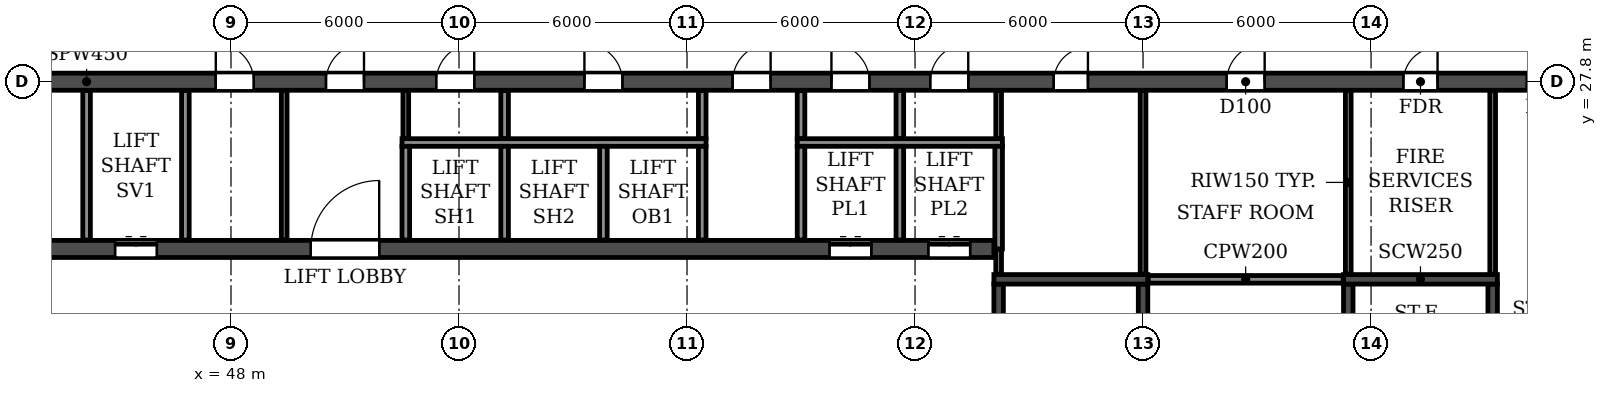
"""IFC4 building model, lengths in metres.
Left out: names, types, materials, properties, quantities, classifications, styles, units other than length and angle.
Written with IfcOpenShell. Run it as: python <this file> out.ifc"""

import sys

from ifc_helpers import new_model, si_unit, direction, frame, frame_2d, origin, place, context, subcontext, project, spatial, rectangle, extrude, element, fill, save


model = new_model("IFC4")
c1 = context("Model", 3, precision=1e-05, world=origin(), true_north=direction((0.0, 1.0)))
c2 = subcontext(c1, "Body", "Model", "MODEL_VIEW")
j1 = project(units=[si_unit("LENGTHUNIT", "METRE"), si_unit("PLANEANGLEUNIT", "RADIAN")], contexts=[c1])
p1 = place(None, origin())
s1 = spatial("IfcSite", under=j1, at=p1, CompositionType="ELEMENT")
p2 = place(p1, origin())
s2 = spatial("IfcBuilding", under=s1, at=p2, CompositionType="ELEMENT")
p3 = place(p2, frame((0.0, 0.0, 15.0)))
s3 = spatial("IfcBuildingStorey", under=s2, at=p3, CompositionType="ELEMENT", Elevation=15.0)
p4 = place(p3, frame((18.0, 27.8, 0.0), z_axis=(0.0, 0.0, 1.0), x_axis=(1.0, 0.0, 0.0)))
e1 = element("IfcWall", 1, at=p4, inside=s3, PredefinedType="SOLIDWALL", context=c2, shape_type="SweptSolid", body=[
    extrude(rectangle(XDim=66.0, YDim=0.45, at=frame_2d((33.0, 0.0))), origin(), (0.0, 0.0, 1.0), 3.92),
])
p5 = place(p4, frame((0.9, 0.0, 0.0)))
e2 = element("IfcOpeningElement", 2, at=p5, cuts=e1, PredefinedType="OPENING", context=c2, shape_type="SweptSolid", body=[
    extrude(rectangle(XDim=1.0, YDim=2.1, at=frame_2d((0.5, 1.05))), frame((0.0, 0.235, 0.0), z_axis=(0.0, -1.0, 0.0), x_axis=(1.0, 0.0, 0.0)), (0.0, 0.0, 1.0), 0.47),
])
p6 = place(p4, frame((4.25, 0.0, 0.0)))
e3 = element("IfcOpeningElement", 3, at=p6, cuts=e1, PredefinedType="OPENING", context=c2, shape_type="SweptSolid", body=[
    extrude(rectangle(XDim=0.9, YDim=2.1, at=frame_2d((0.45, 1.05))), frame((0.0, 0.235, 0.0), z_axis=(0.0, -1.0, 0.0), x_axis=(1.0, 0.0, 0.0)), (0.0, 0.0, 1.0), 0.47),
])
p7 = place(p4, frame((8.85, 0.0, 0.0)))
e4 = element("IfcOpeningElement", 4, at=p7, cuts=e1, PredefinedType="OPENING", context=c2, shape_type="SweptSolid", body=[
    extrude(rectangle(XDim=0.9, YDim=2.1, at=frame_2d((0.45, 1.05))), frame((0.0, 0.235, 0.0), z_axis=(0.0, -1.0, 0.0), x_axis=(1.0, 0.0, 0.0)), (0.0, 0.0, 1.0), 0.47),
])
p8 = place(p4, frame((13.45, 0.0, 0.0)))
e5 = element("IfcOpeningElement", 5, at=p8, cuts=e1, PredefinedType="OPENING", context=c2, shape_type="SweptSolid", body=[
    extrude(rectangle(XDim=0.9, YDim=2.1, at=frame_2d((0.45, 1.05))), frame((0.0, 0.235, 0.0), z_axis=(0.0, -1.0, 0.0), x_axis=(1.0, 0.0, 0.0)), (0.0, 0.0, 1.0), 0.47),
])
p9 = place(p4, frame((16.6, 0.0, 0.0)))
e6 = element("IfcOpeningElement", 6, at=p9, cuts=e1, PredefinedType="OPENING", context=c2, shape_type="SweptSolid", body=[
    extrude(rectangle(XDim=1.0, YDim=2.1, at=frame_2d((0.5, 1.05))), frame((0.0, 0.235, 0.0), z_axis=(0.0, -1.0, 0.0), x_axis=(1.0, 0.0, 0.0)), (0.0, 0.0, 1.0), 0.47),
])
p10 = place(p4, frame((21.8, 0.0, 0.0)))
e7 = element("IfcOpeningElement", 7, at=p10, cuts=e1, PredefinedType="OPENING", context=c2, shape_type="SweptSolid", body=[
    extrude(rectangle(XDim=1.0, YDim=2.1, at=frame_2d((0.5, 1.05))), frame((0.0, 0.235, 0.0), z_axis=(0.0, -1.0, 0.0), x_axis=(1.0, 0.0, 0.0)), (0.0, 0.0, 1.0), 0.47),
])
p11 = place(p4, frame((29.6, 0.0, 0.0)))
e8 = element("IfcOpeningElement", 8, at=p11, cuts=e1, PredefinedType="OPENING", context=c2, shape_type="SweptSolid", body=[
    extrude(rectangle(XDim=1.0, YDim=2.1, at=frame_2d((0.5, 1.05))), frame((0.0, 0.235, 0.0), z_axis=(0.0, -1.0, 0.0), x_axis=(1.0, 0.0, 0.0)), (0.0, 0.0, 1.0), 0.47),
])
p12 = place(p4, frame((32.5, 0.0, 0.0)))
e9 = element("IfcOpeningElement", 9, at=p12, cuts=e1, PredefinedType="OPENING", context=c2, shape_type="SweptSolid", body=[
    extrude(rectangle(XDim=1.0, YDim=2.1, at=frame_2d((0.5, 1.05))), frame((0.0, 0.235, 0.0), z_axis=(0.0, -1.0, 0.0), x_axis=(1.0, 0.0, 0.0)), (0.0, 0.0, 1.0), 0.47),
])
p13 = place(p4, frame((35.4, 0.0, 0.0)))
e10 = element("IfcOpeningElement", 10, at=p13, cuts=e1, PredefinedType="OPENING", context=c2, shape_type="SweptSolid", body=[
    extrude(rectangle(XDim=1.0, YDim=2.1, at=frame_2d((0.5, 1.05))), frame((0.0, 0.235, 0.0), z_axis=(0.0, -1.0, 0.0), x_axis=(1.0, 0.0, 0.0)), (0.0, 0.0, 1.0), 0.47),
])
p14 = place(p4, frame((39.3, 0.0, 0.0)))
e11 = element("IfcOpeningElement", 11, at=p14, cuts=e1, PredefinedType="OPENING", context=c2, shape_type="SweptSolid", body=[
    extrude(rectangle(XDim=1.0, YDim=2.1, at=frame_2d((0.5, 1.05))), frame((0.0, 0.235, 0.0), z_axis=(0.0, -1.0, 0.0), x_axis=(1.0, 0.0, 0.0)), (0.0, 0.0, 1.0), 0.47),
])
p15 = place(p4, frame((43.2, 0.0, 0.0)))
e12 = element("IfcOpeningElement", 12, at=p15, cuts=e1, PredefinedType="OPENING", context=c2, shape_type="SweptSolid", body=[
    extrude(rectangle(XDim=1.0, YDim=2.1, at=frame_2d((0.5, 1.05))), frame((0.0, 0.235, 0.0), z_axis=(0.0, -1.0, 0.0), x_axis=(1.0, 0.0, 0.0)), (0.0, 0.0, 1.0), 0.47),
])
p16 = place(p4, frame((45.8, 0.0, 0.0)))
e13 = element("IfcOpeningElement", 13, at=p16, cuts=e1, PredefinedType="OPENING", context=c2, shape_type="SweptSolid", body=[
    extrude(rectangle(XDim=1.0, YDim=2.1, at=frame_2d((0.5, 1.05))), frame((0.0, 0.235, 0.0), z_axis=(0.0, -1.0, 0.0), x_axis=(1.0, 0.0, 0.0)), (0.0, 0.0, 1.0), 0.47),
])
p17 = place(p4, frame((48.4, 0.0, 0.0)))
e14 = element("IfcOpeningElement", 14, at=p17, cuts=e1, PredefinedType="OPENING", context=c2, shape_type="SweptSolid", body=[
    extrude(rectangle(XDim=1.0, YDim=2.1, at=frame_2d((0.5, 1.05))), frame((0.0, 0.235, 0.0), z_axis=(0.0, -1.0, 0.0), x_axis=(1.0, 0.0, 0.0)), (0.0, 0.0, 1.0), 0.47),
])
p18 = place(p4, frame((51.65, 0.0, 0.0)))
e15 = element("IfcOpeningElement", 15, at=p18, cuts=e1, PredefinedType="OPENING", context=c2, shape_type="SweptSolid", body=[
    extrude(rectangle(XDim=0.9, YDim=2.1, at=frame_2d((0.45, 1.05))), frame((0.0, 0.235, 0.0), z_axis=(0.0, -1.0, 0.0), x_axis=(1.0, 0.0, 0.0)), (0.0, 0.0, 1.0), 0.47),
])
p19 = place(p4, frame((56.2, 0.0, 0.0)))
e16 = element("IfcOpeningElement", 16, at=p19, cuts=e1, PredefinedType="OPENING", context=c2, shape_type="SweptSolid", body=[
    extrude(rectangle(XDim=1.0, YDim=2.1, at=frame_2d((0.5, 1.05))), frame((0.0, 0.235, 0.0), z_axis=(0.0, -1.0, 0.0), x_axis=(1.0, 0.0, 0.0)), (0.0, 0.0, 1.0), 0.47),
])
p20 = place(p4, frame((60.85, 0.0, 0.0)))
e17 = element("IfcOpeningElement", 17, at=p20, cuts=e1, PredefinedType="OPENING", context=c2, shape_type="SweptSolid", body=[
    extrude(rectangle(XDim=0.9, YDim=2.1, at=frame_2d((0.45, 1.05))), frame((0.0, 0.235, 0.0), z_axis=(0.0, -1.0, 0.0), x_axis=(1.0, 0.0, 0.0)), (0.0, 0.0, 1.0), 0.47),
])
p21 = place(p4, frame((64.1, 0.0, 0.0)))
e18 = element("IfcOpeningElement", 18, at=p21, cuts=e1, PredefinedType="OPENING", context=c2, shape_type="SweptSolid", body=[
    extrude(rectangle(XDim=1.0, YDim=2.1, at=frame_2d((0.5, 1.05))), frame((0.0, 0.235, 0.0), z_axis=(0.0, -1.0, 0.0), x_axis=(1.0, 0.0, 0.0)), (0.0, 0.0, 1.0), 0.47),
])
p22 = place(p3, frame((33.925, 23.4, 0.0), z_axis=(0.0, 0.0, 1.0), x_axis=(1.0, 0.0, 0.0)))
e19 = element("IfcWall", 19, at=p22, inside=s3, PredefinedType="SOLIDWALL", context=c2, shape_type="SweptSolid", body=[
    extrude(rectangle(XDim=34.15, YDim=0.45, at=frame_2d((17.075, 0.0))), origin(), (0.0, 0.0, 1.0), 3.92),
])
p23 = place(p22, frame((16.175, 0.0, 0.0)))
e20 = element("IfcOpeningElement", 20, at=p23, cuts=e19, PredefinedType="OPENING", context=c2, shape_type="SweptSolid", body=[
    extrude(rectangle(XDim=1.8, YDim=2.1, at=frame_2d((0.9, 1.05))), frame((0.0, 0.235, 0.0), z_axis=(0.0, -1.0, 0.0), x_axis=(1.0, 0.0, 0.0)), (0.0, 0.0, 1.0), 0.47),
])
p24 = place(p22, frame((11.025, 0.0, 0.0)))
e21 = element("IfcOpeningElement", 21, at=p24, cuts=e19, PredefinedType="OPENING", context=c2, shape_type="SweptSolid", body=[
    extrude(rectangle(XDim=1.1, YDim=2.1, at=frame_2d((0.55, 1.05))), frame((0.0, 0.235, 0.0), z_axis=(0.0, -1.0, 0.0), x_axis=(1.0, 0.0, 0.0)), (0.0, 0.0, 1.0), 0.47),
])
p25 = place(p22, frame((29.825, 0.0, 0.0)))
e22 = element("IfcOpeningElement", 22, at=p25, cuts=e19, PredefinedType="OPENING", context=c2, shape_type="SweptSolid", body=[
    extrude(rectangle(XDim=1.1, YDim=2.1, at=frame_2d((0.55, 1.05))), frame((0.0, 0.235, 0.0), z_axis=(0.0, -1.0, 0.0), x_axis=(1.0, 0.0, 0.0)), (0.0, 0.0, 1.0), 0.47),
])
p26 = place(p22, frame((32.425, 0.0, 0.0)))
e23 = element("IfcOpeningElement", 23, at=p26, cuts=e19, PredefinedType="OPENING", context=c2, shape_type="SweptSolid", body=[
    extrude(rectangle(XDim=1.1, YDim=2.1, at=frame_2d((0.55, 1.05))), frame((0.0, 0.235, 0.0), z_axis=(0.0, -1.0, 0.0), x_axis=(1.0, 0.0, 0.0)), (0.0, 0.0, 1.0), 0.47),
])
p27 = place(p3, frame((68.2, 14.825, 0.0), z_axis=(0.0, 0.0, 1.0), x_axis=(0.0, 1.0, 0.0)))
e24 = element("IfcWall", 24, at=p27, inside=s3, PredefinedType="SOLIDWALL", context=c2, shape_type="SweptSolid", body=[
    extrude(rectangle(XDim=7.65, YDim=0.25, at=frame_2d((3.825, 0.0))), origin(), (0.0, 0.0, 1.0), 3.92),
])
p28 = place(p27, frame((0.475, 0.0, 0.0)))
e25 = element("IfcOpeningElement", 25, at=p28, cuts=e24, PredefinedType="OPENING", context=c2, shape_type="SweptSolid", body=[
    extrude(rectangle(XDim=1.0, YDim=2.1, at=frame_2d((0.5, 1.05))), frame((0.0, 0.135, 0.0), z_axis=(0.0, -1.0, 0.0), x_axis=(1.0, 0.0, 0.0)), (0.0, 0.0, 1.0), 0.27),
])
p29 = place(p3, frame((72.0, 14.825, 0.0), z_axis=(0.0, 0.0, 1.0), x_axis=(0.0, 1.0, 0.0)))
e26 = element("IfcWall", 26, at=p29, inside=s3, PredefinedType="SOLIDWALL", context=c2, shape_type="SweptSolid", body=[
    extrude(rectangle(XDim=7.65, YDim=0.25, at=frame_2d((3.825, 0.0))), origin(), (0.0, 0.0, 1.0), 3.92),
])
p30 = place(p3, frame((68.075, 22.6, 0.0), z_axis=(0.0, 0.0, 1.0), x_axis=(1.0, 0.0, 0.0)))
e27 = element("IfcWall", 27, at=p30, inside=s3, PredefinedType="SOLIDWALL", context=c2, shape_type="SweptSolid", body=[
    extrude(rectangle(XDim=4.05, YDim=0.25, at=frame_2d((2.025, 0.0))), origin(), (0.0, 0.0, 1.0), 3.92),
])
p31 = place(p3, frame((77.4, 14.825, 0.0), z_axis=(0.0, 0.0, 1.0), x_axis=(0.0, 1.0, 0.0)))
e28 = element("IfcWall", 28, at=p31, inside=s3, PredefinedType="SOLIDWALL", context=c2, shape_type="SweptSolid", body=[
    extrude(rectangle(XDim=7.65, YDim=0.25, at=frame_2d((3.825, 0.0))), origin(), (0.0, 0.0, 1.0), 3.92),
])
p32 = place(p3, frame((81.2, 14.825, 0.0), z_axis=(0.0, 0.0, 1.0), x_axis=(0.0, 1.0, 0.0)))
e29 = element("IfcWall", 29, at=p32, inside=s3, PredefinedType="SOLIDWALL", context=c2, shape_type="SweptSolid", body=[
    extrude(rectangle(XDim=7.65, YDim=0.25, at=frame_2d((3.825, 0.0))), origin(), (0.0, 0.0, 1.0), 3.92),
])
p33 = place(p32, frame((0.475, 0.0, 0.0)))
e30 = element("IfcOpeningElement", 30, at=p33, cuts=e29, PredefinedType="OPENING", context=c2, shape_type="SweptSolid", body=[
    extrude(rectangle(XDim=1.0, YDim=2.1, at=frame_2d((0.5, 1.05))), frame((0.0, 0.135, 0.0), z_axis=(0.0, -1.0, 0.0), x_axis=(1.0, 0.0, 0.0)), (0.0, 0.0, 1.0), 0.27),
])
p34 = place(p3, frame((77.275, 22.6, 0.0), z_axis=(0.0, 0.0, 1.0), x_axis=(1.0, 0.0, 0.0)))
e31 = element("IfcWall", 31, at=p34, inside=s3, PredefinedType="SOLIDWALL", context=c2, shape_type="SweptSolid", body=[
    extrude(rectangle(XDim=4.05, YDim=0.25, at=frame_2d((2.025, 0.0))), origin(), (0.0, 0.0, 1.0), 3.92),
])
p35 = place(p3, frame((49.4, 23.635, 0.0), z_axis=(0.0, 0.0, 1.0), x_axis=(0.0, 1.0, 0.0)))
e32 = element("IfcWall", 32, at=p35, inside=s3, PredefinedType="PARTITIONING", context=c2, shape_type="SweptSolid", body=[
    extrude(rectangle(XDim=3.93, YDim=0.15, at=frame_2d((1.965, 0.0))), origin(), (0.0, 0.0, 1.0), 3.92),
])
p36 = place(p3, frame((52.6, 26.3, 0.0), z_axis=(0.0, 0.0, 1.0), x_axis=(0.0, 1.0, 0.0)))
e33 = element("IfcWall", 33, at=p36, inside=s3, PredefinedType="PARTITIONING", context=c2, shape_type="SweptSolid", body=[
    extrude(rectangle(XDim=1.265, YDim=0.15, at=frame_2d((0.632, 0.0))), origin(), (0.0, 0.0, 1.0), 3.92),
])
for number, where, z_axis, x_axis in (
    (34, (55.2, 26.3, 0.0), (0.0, 0.0, 1.0), (0.0, 1.0, 0.0)),
    (35, (60.4, 26.3, 0.0), (0.0, 0.0, 1.0), (0.0, 1.0, 0.0)),
):
    element("IfcWall", number, at=place(p3, frame(where, z_axis=z_axis, x_axis=x_axis)), inside=s3, PredefinedType="PARTITIONING", context=c2, shape_type="SweptSolid", body=[
        extrude(rectangle(XDim=1.265, YDim=0.2, at=frame_2d((0.632, 0.0))), origin(), (0.0, 0.0, 1.0), 3.92),
    ])
p37 = place(p3, frame((72.135, 22.6, 0.0), z_axis=(0.0, 0.0, 1.0), x_axis=(1.0, 0.0, 0.0)))
e36 = element("IfcWall", 36, at=p37, inside=s3, PredefinedType="PARTITIONING", context=c2, shape_type="SweptSolid", body=[
    extrude(rectangle(XDim=5.13, YDim=0.2, at=frame_2d((2.565, 0.0))), origin(), (0.0, 0.0, 1.0), 3.92),
])
for number, where, z_axis, x_axis in (
    (37, (63.0, 26.3, 0.0), (0.0, 0.0, 1.0), (0.0, 1.0, 0.0)),
    (38, (65.6, 26.3, 0.0), (0.0, 0.0, 1.0), (0.0, 1.0, 0.0)),
):
    element("IfcWall", number, at=place(p3, frame(where, z_axis=z_axis, x_axis=x_axis)), inside=s3, PredefinedType="PARTITIONING", context=c2, shape_type="SweptSolid", body=[
        extrude(rectangle(XDim=1.265, YDim=0.2, at=frame_2d((0.632, 0.0))), origin(), (0.0, 0.0, 1.0), 3.92),
    ])
p38 = place(p3, frame((68.2, 22.735, 0.0), z_axis=(0.0, 0.0, 1.0), x_axis=(0.0, 1.0, 0.0)))
e39 = element("IfcWall", 39, at=p38, inside=s3, PredefinedType="PARTITIONING", context=c2, shape_type="SweptSolid", body=[
    extrude(rectangle(XDim=0.665, YDim=0.15, at=frame_2d((0.333, 0.0))), origin(), (0.0, 0.0, 1.0), 3.92),
])
p39 = place(p3, frame((68.2, 26.3, 0.0), z_axis=(0.0, 0.0, 1.0), x_axis=(0.0, 1.0, 0.0)))
e40 = element("IfcWall", 40, at=p39, inside=s3, PredefinedType="PARTITIONING", context=c2, shape_type="SweptSolid", body=[
    extrude(rectangle(XDim=1.265, YDim=0.15, at=frame_2d((0.632, 0.0))), origin(), (0.0, 0.0, 1.0), 3.92),
])
for number, where, z_axis, x_axis in (
    (41, (72.0, 22.735, 0.0), (0.0, 0.0, 1.0), (0.0, 1.0, 0.0)),
    (42, (77.4, 22.735, 0.0), (0.0, 0.0, 1.0), (0.0, 1.0, 0.0)),
    (43, (81.2, 22.735, 0.0), (0.0, 0.0, 1.0), (0.0, 1.0, 0.0)),
):
    element("IfcWall", number, at=place(p3, frame(where, z_axis=z_axis, x_axis=x_axis)), inside=s3, PredefinedType="PARTITIONING", context=c2, shape_type="SweptSolid", body=[
        extrude(rectangle(XDim=4.83, YDim=0.15, at=frame_2d((2.415, 0.0))), origin(), (0.0, 0.0, 1.0), 3.92),
    ])
p40 = place(p3, frame((52.5, 26.2, 0.0), z_axis=(0.0, 0.0, 1.0), x_axis=(1.0, 0.0, 0.0)))
e44 = element("IfcWall", 44, at=p40, inside=s3, PredefinedType="PARTITIONING", context=c2, shape_type="SweptSolid", body=[
    extrude(rectangle(XDim=8.0, YDim=0.2, at=frame_2d((4.0, 0.0))), origin(), (0.0, 0.0, 1.0), 3.92),
])
p41 = place(p3, frame((62.9, 26.2, 0.0), z_axis=(0.0, 0.0, 1.0), x_axis=(1.0, 0.0, 0.0)))
e45 = element("IfcWall", 45, at=p41, inside=s3, PredefinedType="PARTITIONING", context=c2, shape_type="SweptSolid", body=[
    extrude(rectangle(XDim=5.4, YDim=0.2, at=frame_2d((2.7, 0.0))), origin(), (0.0, 0.0, 1.0), 3.92),
])
for number, where, z_axis, x_axis in (
    (46, (44.2, 23.635, 0.0), (0.0, 0.0, 1.0), (0.0, 1.0, 0.0)),
    (47, (46.8, 23.635, 0.0), (0.0, 0.0, 1.0), (0.0, 1.0, 0.0)),
):
    element("IfcWall", number, at=place(p3, frame(where, z_axis=z_axis, x_axis=x_axis)), inside=s3, PredefinedType="PARTITIONING", context=c2, shape_type="SweptSolid", body=[
        extrude(rectangle(XDim=3.93, YDim=0.2, at=frame_2d((1.965, 0.0))), origin(), (0.0, 0.0, 1.0), 3.92),
    ])
for number, where, z_axis, x_axis in (
    (48, (52.6, 23.635, 0.0), (0.0, 0.0, 1.0), (0.0, 1.0, 0.0)),
    (49, (55.2, 23.635, 0.0), (0.0, 0.0, 1.0), (0.0, 1.0, 0.0)),
    (50, (57.8, 23.635, 0.0), (0.0, 0.0, 1.0), (0.0, 1.0, 0.0)),
    (51, (60.4, 23.635, 0.0), (0.0, 0.0, 1.0), (0.0, 1.0, 0.0)),
    (52, (63.0, 23.635, 0.0), (0.0, 0.0, 1.0), (0.0, 1.0, 0.0)),
    (53, (65.6, 23.635, 0.0), (0.0, 0.0, 1.0), (0.0, 1.0, 0.0)),
):
    element("IfcWall", number, at=place(p3, frame(where, z_axis=z_axis, x_axis=x_axis)), inside=s3, PredefinedType="PARTITIONING", context=c2, shape_type="SweptSolid", body=[
        extrude(rectangle(XDim=2.465, YDim=0.2, at=frame_2d((1.232, 0.0))), origin(), (0.0, 0.0, 1.0), 3.92),
    ])
p42 = place(p3, frame((68.2, 23.4, 0.0), z_axis=(0.0, 0.0, 1.0), x_axis=(0.0, 1.0, 0.0)))
e54 = element("IfcWall", 54, at=p42, inside=s3, PredefinedType="PARTITIONING", context=c2, shape_type="SweptSolid", body=[
    extrude(rectangle(XDim=2.7, YDim=0.2, at=frame_2d((1.35, 0.0))), origin(), (0.0, 0.0, 1.0), 3.92),
])
p43 = place(p11, origin())
e55 = element("IfcDoor", 55, at=p43, inside=s3, OperationType="SINGLE_SWING_LEFT", PredefinedType="DOOR", context=c2, shape_type="SweptSolid", body=[
    extrude(rectangle(XDim=1.0, YDim=2.1, at=frame_2d((0.5, 1.05))), frame((0.0, 0.025, 0.0), z_axis=(0.0, -1.0, 0.0), x_axis=(1.0, 0.0, 0.0)), (0.0, 0.0, 1.0), 0.05),
])
fill(e8, e55)
p44 = place(p12, origin())
e56 = element("IfcDoor", 56, at=p44, inside=s3, OperationType="SINGLE_SWING_RIGHT", PredefinedType="DOOR", context=c2, shape_type="SweptSolid", body=[
    extrude(rectangle(XDim=1.0, YDim=2.1, at=frame_2d((0.5, 1.05))), frame((0.0, 0.025, 0.0), z_axis=(0.0, -1.0, 0.0), x_axis=(1.0, 0.0, 0.0)), (0.0, 0.0, 1.0), 0.05),
])
fill(e9, e56)
p45 = place(p13, origin())
e57 = element("IfcDoor", 57, at=p45, inside=s3, OperationType="SINGLE_SWING_RIGHT", PredefinedType="DOOR", context=c2, shape_type="SweptSolid", body=[
    extrude(rectangle(XDim=1.0, YDim=2.1, at=frame_2d((0.5, 1.05))), frame((0.0, 0.025, 0.0), z_axis=(0.0, -1.0, 0.0), x_axis=(1.0, 0.0, 0.0)), (0.0, 0.0, 1.0), 0.05),
])
fill(e10, e57)
p46 = place(p14, origin())
e58 = element("IfcDoor", 58, at=p46, inside=s3, OperationType="SINGLE_SWING_LEFT", PredefinedType="DOOR", context=c2, shape_type="SweptSolid", body=[
    extrude(rectangle(XDim=1.0, YDim=2.1, at=frame_2d((0.5, 1.05))), frame((0.0, 0.025, 0.0), z_axis=(0.0, -1.0, 0.0), x_axis=(1.0, 0.0, 0.0)), (0.0, 0.0, 1.0), 0.05),
])
fill(e11, e58)
p47 = place(p15, origin())
e59 = element("IfcDoor", 59, at=p47, inside=s3, OperationType="SINGLE_SWING_RIGHT", PredefinedType="DOOR", context=c2, shape_type="SweptSolid", body=[
    extrude(rectangle(XDim=1.0, YDim=2.1, at=frame_2d((0.5, 1.05))), frame((0.0, 0.025, 0.0), z_axis=(0.0, -1.0, 0.0), x_axis=(1.0, 0.0, 0.0)), (0.0, 0.0, 1.0), 0.05),
])
fill(e12, e59)
p48 = place(p16, origin())
e60 = element("IfcDoor", 60, at=p48, inside=s3, OperationType="SINGLE_SWING_LEFT", PredefinedType="DOOR", context=c2, shape_type="SweptSolid", body=[
    extrude(rectangle(XDim=1.0, YDim=2.1, at=frame_2d((0.5, 1.05))), frame((0.0, 0.025, 0.0), z_axis=(0.0, -1.0, 0.0), x_axis=(1.0, 0.0, 0.0)), (0.0, 0.0, 1.0), 0.05),
])
fill(e13, e60)
p49 = place(p17, origin())
e61 = element("IfcDoor", 61, at=p49, inside=s3, OperationType="SINGLE_SWING_RIGHT", PredefinedType="DOOR", context=c2, shape_type="SweptSolid", body=[
    extrude(rectangle(XDim=1.0, YDim=2.1, at=frame_2d((0.5, 1.05))), frame((0.0, 0.025, 0.0), z_axis=(0.0, -1.0, 0.0), x_axis=(1.0, 0.0, 0.0)), (0.0, 0.0, 1.0), 0.05),
])
fill(e14, e61)
p50 = place(p18, origin())
e62 = element("IfcDoor", 62, at=p50, inside=s3, OperationType="SINGLE_SWING_RIGHT", PredefinedType="DOOR", context=c2, shape_type="SweptSolid", body=[
    extrude(rectangle(XDim=0.9, YDim=2.1, at=frame_2d((0.45, 1.05))), frame((0.0, 0.025, 0.0), z_axis=(0.0, -1.0, 0.0), x_axis=(1.0, 0.0, 0.0)), (0.0, 0.0, 1.0), 0.05),
])
fill(e15, e62)
p51 = place(p19, origin())
e63 = element("IfcDoor", 63, at=p51, inside=s3, OperationType="SINGLE_SWING_RIGHT", PredefinedType="DOOR", context=c2, shape_type="SweptSolid", body=[
    extrude(rectangle(XDim=1.0, YDim=2.1, at=frame_2d((0.5, 1.05))), frame((0.0, 0.025, 0.0), z_axis=(0.0, -1.0, 0.0), x_axis=(1.0, 0.0, 0.0)), (0.0, 0.0, 1.0), 0.05),
])
fill(e16, e63)
p52 = place(p20, origin())
e64 = element("IfcDoor", 64, at=p52, inside=s3, OperationType="SINGLE_SWING_RIGHT", PredefinedType="DOOR", context=c2, shape_type="SweptSolid", body=[
    extrude(rectangle(XDim=0.9, YDim=2.1, at=frame_2d((0.45, 1.05))), frame((0.0, 0.025, 0.0), z_axis=(0.0, -1.0, 0.0), x_axis=(1.0, 0.0, 0.0)), (0.0, 0.0, 1.0), 0.05),
])
fill(e17, e64)
p53 = place(p21, origin())
e65 = element("IfcDoor", 65, at=p53, inside=s3, OperationType="SINGLE_SWING_RIGHT", PredefinedType="DOOR", context=c2, shape_type="SweptSolid", body=[
    extrude(rectangle(XDim=1.0, YDim=2.1, at=frame_2d((0.5, 1.05))), frame((0.0, 0.025, 0.0), z_axis=(0.0, -1.0, 0.0), x_axis=(1.0, 0.0, 0.0)), (0.0, 0.0, 1.0), 0.05),
])
fill(e18, e65)
p54 = place(p23, origin())
e66 = element("IfcDoor", 66, at=p54, inside=s3, OperationType="DOUBLE_DOOR_SINGLE_SWING", PredefinedType="DOOR", context=c2, shape_type="SweptSolid", body=[
    extrude(rectangle(XDim=1.8, YDim=2.1, at=frame_2d((0.9, 1.05))), frame((0.0, 0.025, 0.0), z_axis=(0.0, -1.0, 0.0), x_axis=(1.0, 0.0, 0.0)), (0.0, 0.0, 1.0), 0.05),
])
fill(e20, e66)
p55 = place(p24, origin())
e67 = element("IfcDoor", 67, at=p55, inside=s3, OperationType="DOUBLE_DOOR_SLIDING", PredefinedType="DOOR", context=c2, shape_type="SweptSolid", body=[
    extrude(rectangle(XDim=1.1, YDim=2.1, at=frame_2d((0.55, 1.05))), frame((0.0, 0.025, 0.0), z_axis=(0.0, -1.0, 0.0), x_axis=(1.0, 0.0, 0.0)), (0.0, 0.0, 1.0), 0.05),
])
fill(e21, e67)
p56 = place(p25, origin())
e68 = element("IfcDoor", 68, at=p56, inside=s3, OperationType="DOUBLE_DOOR_SLIDING", PredefinedType="DOOR", context=c2, shape_type="SweptSolid", body=[
    extrude(rectangle(XDim=1.1, YDim=2.1, at=frame_2d((0.55, 1.05))), frame((0.0, 0.025, 0.0), z_axis=(0.0, -1.0, 0.0), x_axis=(1.0, 0.0, 0.0)), (0.0, 0.0, 1.0), 0.05),
])
fill(e22, e68)
p57 = place(p26, origin())
e69 = element("IfcDoor", 69, at=p57, inside=s3, OperationType="DOUBLE_DOOR_SLIDING", PredefinedType="DOOR", context=c2, shape_type="SweptSolid", body=[
    extrude(rectangle(XDim=1.1, YDim=2.1, at=frame_2d((0.55, 1.05))), frame((0.0, 0.025, 0.0), z_axis=(0.0, -1.0, 0.0), x_axis=(1.0, 0.0, 0.0)), (0.0, 0.0, 1.0), 0.05),
])
fill(e23, e69)
save(model, sys.argv[1])
